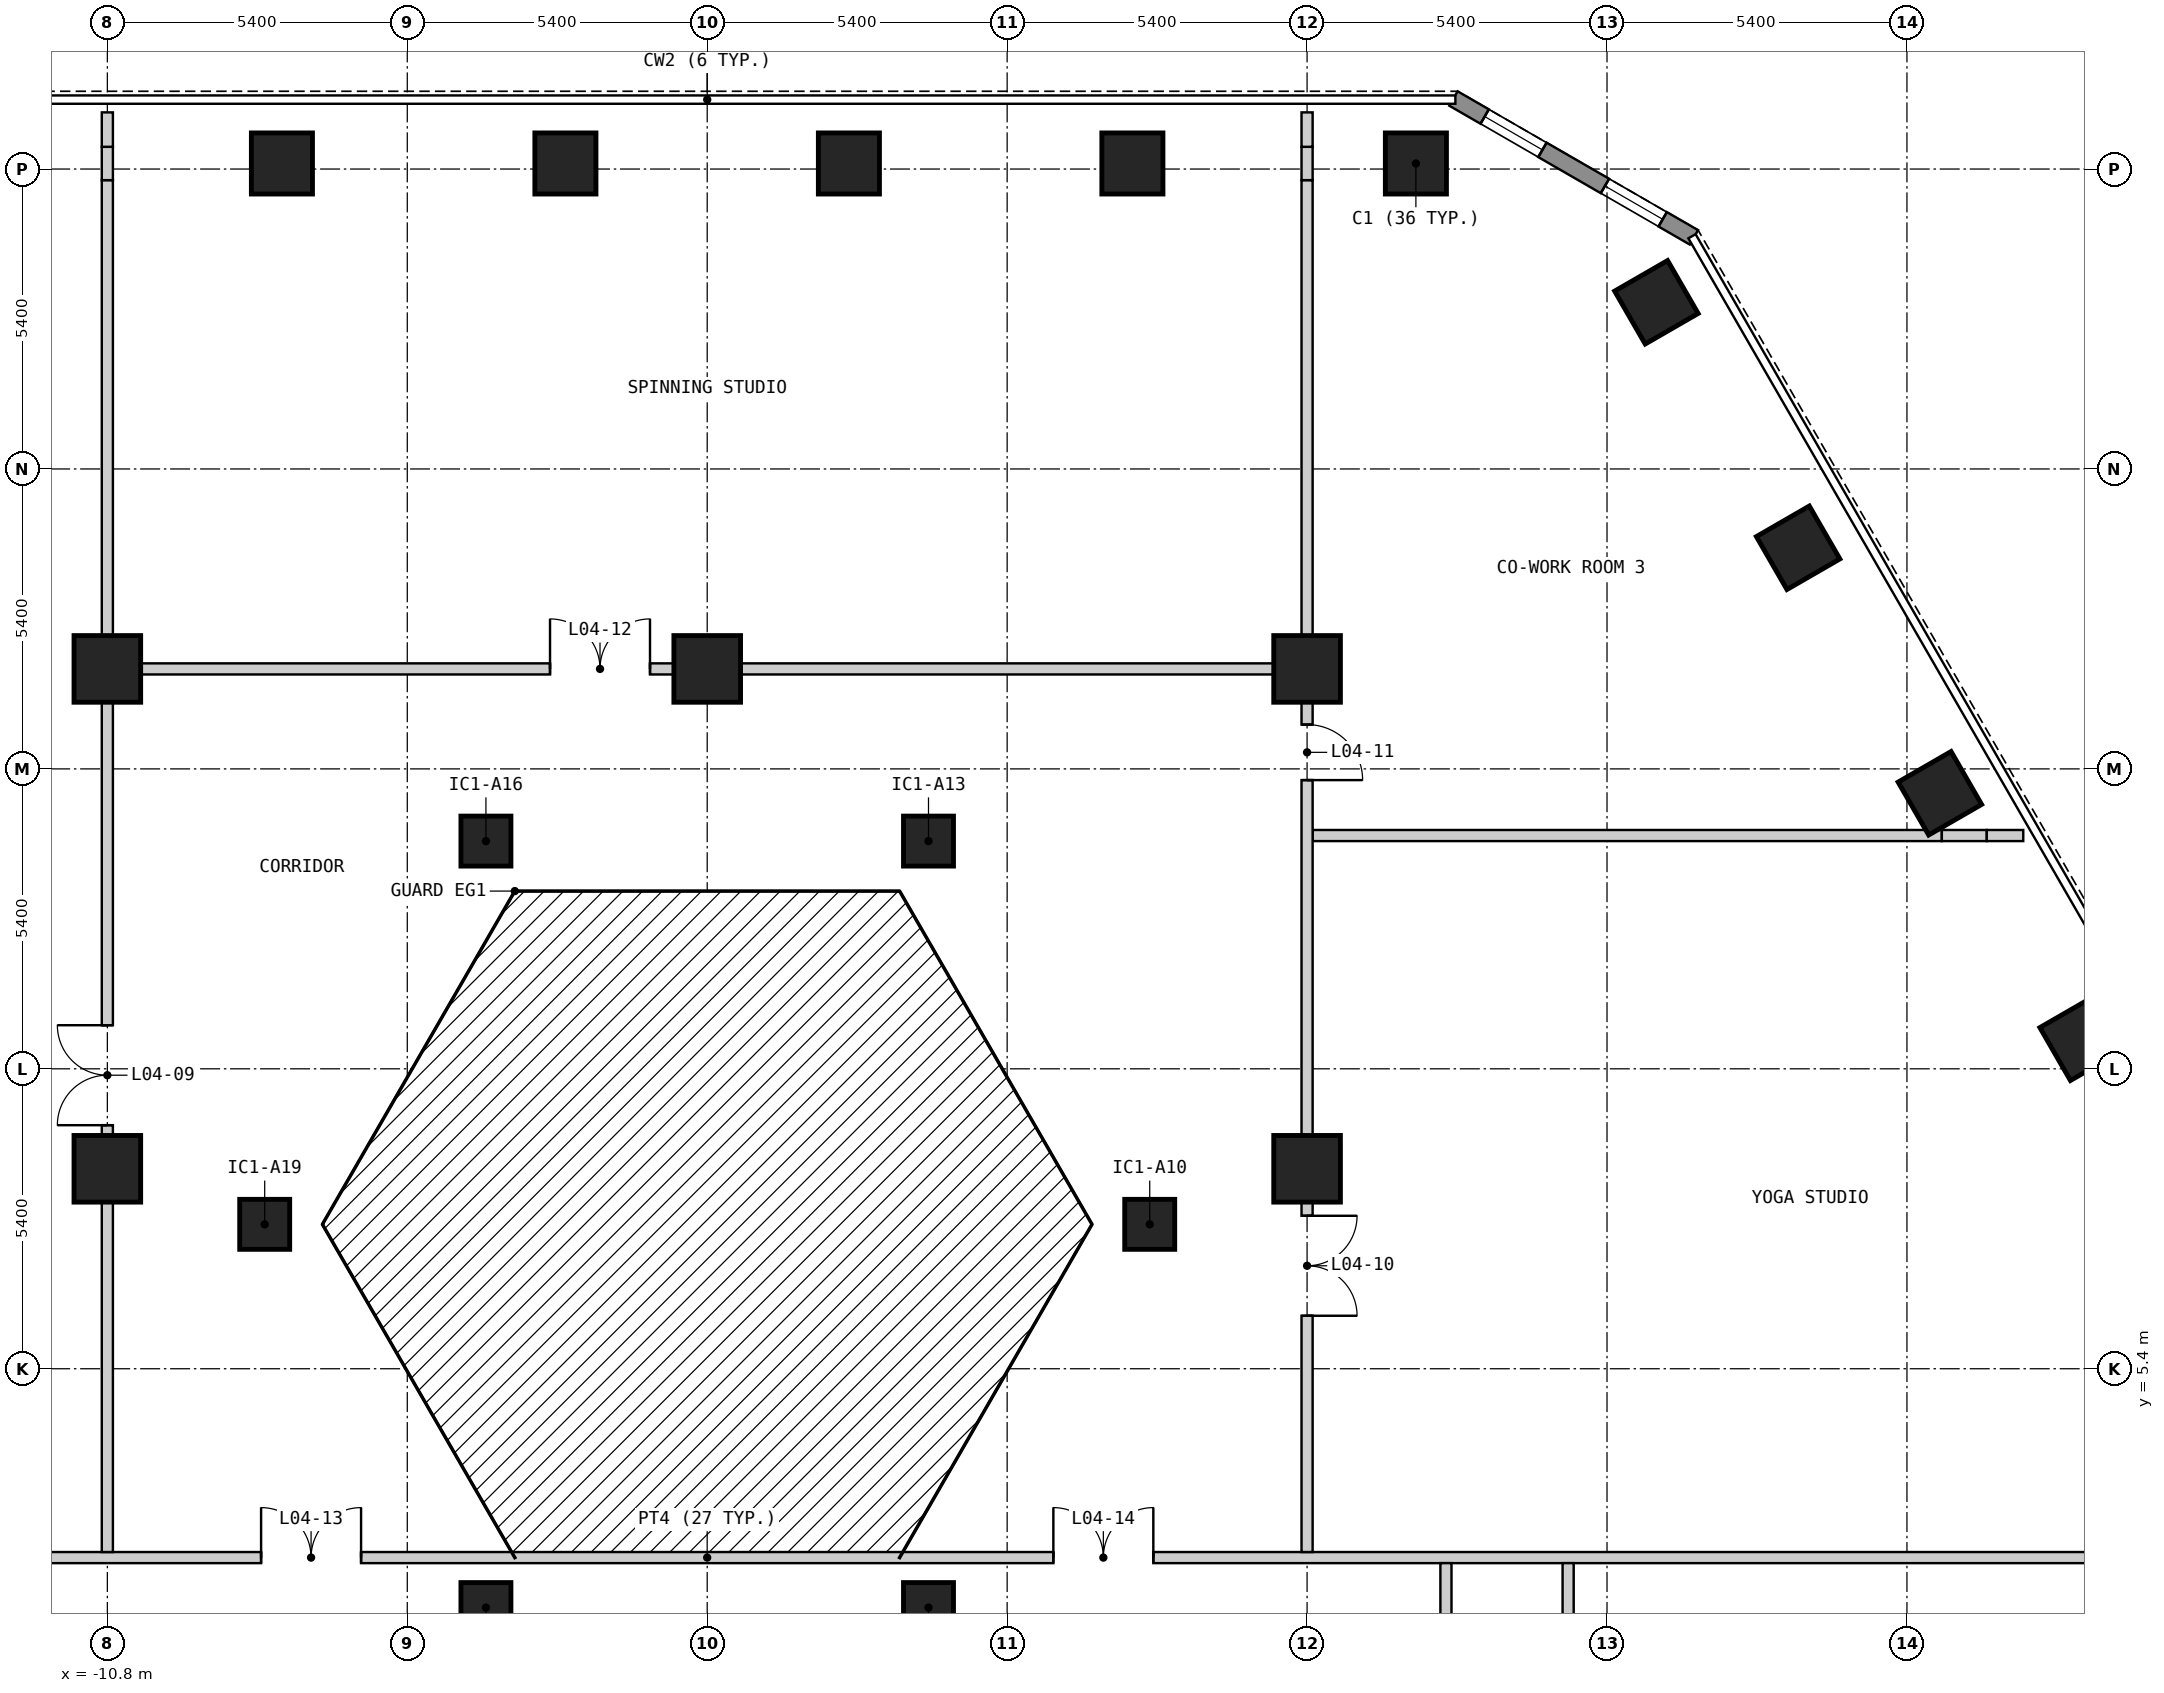
"""IFC4 building model, lengths in metres.
Left out: names, types, materials, properties, quantities, classifications, styles, units other than length and angle.
Written with IfcOpenShell. Run it as: python <this file> out.ifc"""

import sys

from ifc_helpers import new_model, si_unit, direction, frame, frame_2d, origin, origin_2d, place, context, subcontext, project, spatial, polyline, rectangle, outline, extrude, element, fill, save


model = new_model("IFC4")
c1 = context("Model", 3, precision=1e-05, world=origin(), true_north=direction((0.0, 1.0)))
c2 = subcontext(c1, "Body", "Model", "MODEL_VIEW")
j1 = project(units=[si_unit("LENGTHUNIT", "METRE"), si_unit("PLANEANGLEUNIT", "RADIAN")], contexts=[c1])
p1 = place(None, origin())
s1 = spatial("IfcSite", under=j1, at=p1, CompositionType="ELEMENT")
p2 = place(p1, origin())
s2 = spatial("IfcBuilding", under=s1, at=p2, CompositionType="ELEMENT")
p3 = place(p2, frame((0.0, 0.0, 16.2)))
s3 = spatial("IfcBuildingStorey", under=s2, at=p3, CompositionType="ELEMENT", Elevation=16.2)
for number, where, z_axis, x_axis in (
    (1, (12.759, 27.1, 0.0), (0.0, 0.0, 1.0), (-1.0, 0.0, 0.0)),
    (2, (7.655, 27.1, 0.0), (0.0, 0.0, 1.0), (-1.0, 0.0, 0.0)),
    (3, (2.551, 27.1, 0.0), (0.0, 0.0, 1.0), (-1.0, 0.0, 0.0)),
    (4, (-2.553, 27.1, 0.0), (0.0, 0.0, 1.0), (-1.0, 0.0, 0.0)),
    (5, (-7.657, 27.1, 0.0), (0.0, 0.0, 1.0), (-1.0, 0.0, 0.0)),
    (6, (24.745, 11.341, 0.0), (0.0, 0.0, 1.0), (-0.5, 0.866, 0.0)),
    (7, (22.193, 15.761, 0.0), (0.0, 0.0, 1.0), (-0.5, 0.866, 0.0)),
    (8, (19.641, 20.181, 0.0), (0.0, 0.0, 1.0), (-0.5, 0.866, 0.0)),
    (9, (17.089, 24.601, 0.0), (0.0, 0.0, 1.0), (-0.5, 0.866, 0.0)),
):
    element("IfcColumn", number, at=place(p3, frame(where, z_axis=z_axis, x_axis=x_axis)), inside=s3, PredefinedType="COLUMN", context=c2, shape_type="SweptSolid", body=[
        extrude(rectangle(XDim=1.1, YDim=1.1, at=origin_2d()), origin(), (0.0, 0.0, 1.0), 3.6),
    ])
for number, where, z_axis, x_axis in (
    (10, (3.984, 1.1, 0.0), (0.0, 0.0, 1.0), (1.0, 0.0, 0.0)),
    (11, (7.967, 8.0, 0.0), (0.0, 0.0, 1.0), (1.0, 0.0, 0.0)),
    (12, (3.984, 14.9, 0.0), (0.0, 0.0, 1.0), (1.0, 0.0, 0.0)),
    (13, (-3.984, 14.9, 0.0), (0.0, 0.0, 1.0), (1.0, 0.0, 0.0)),
    (14, (-7.967, 8.0, 0.0), (0.0, 0.0, 1.0), (1.0, 0.0, 0.0)),
    (15, (-3.984, 1.1, 0.0), (0.0, 0.0, 1.0), (1.0, 0.0, 0.0)),
):
    element("IfcColumn", number, at=place(p3, frame(where, z_axis=z_axis, x_axis=x_axis)), inside=s3, PredefinedType="COLUMN", context=c2, shape_type="SweptSolid", body=[
        extrude(rectangle(XDim=0.9, YDim=0.9, at=origin_2d()), origin(), (0.0, 0.0, 1.0), 3.6),
    ])
for number, where, z_axis, x_axis in (
    (16, (-10.8, 9.0, 0.0), (0.0, 0.0, 1.0), (1.0, 0.0, 0.0)),
    (17, (-10.8, 18.0, 0.0), (0.0, 0.0, 1.0), (1.0, 0.0, 0.0)),
    (18, (0.0, 18.0, 0.0), (0.0, 0.0, 1.0), (1.0, 0.0, 0.0)),
    (19, (10.8, 9.0, 0.0), (0.0, 0.0, 1.0), (1.0, 0.0, 0.0)),
    (20, (10.8, 18.0, 0.0), (0.0, 0.0, 1.0), (1.0, 0.0, 0.0)),
):
    element("IfcColumn", number, at=place(p3, frame(where, z_axis=z_axis, x_axis=x_axis)), inside=s3, PredefinedType="COLUMN", context=c2, shape_type="SweptSolid", body=[
        extrude(rectangle(XDim=1.2, YDim=1.2, at=origin_2d()), origin(), (0.0, 0.0, 1.0), 3.6),
    ])
p4 = place(p3, frame((17.765, 25.77, 0.0), z_axis=(0.0, 0.0, 1.0), x_axis=(-0.866010750942, 0.50002537861, 0.0)))
e21 = element("IfcWall", 21, at=p4, inside=s3, PredefinedType="SOLIDWALL", context=c2, shape_type="SweptSolid", body=[
    extrude(outline(polyline([(0.0, -0.15), (5.0, -0.15), (4.919, 0.15), (0.08, 0.15), (0.0, -0.15)])), origin(), (0.0, 0.0, 1.0), 3.25),
])
p5 = place(p4, frame((0.65, 0.0, 0.15)))
e22 = element("IfcOpeningElement", 22, at=p5, cuts=e21, PredefinedType="OPENING", context=c2, shape_type="SweptSolid", body=[
    extrude(rectangle(XDim=1.2, YDim=2.1, at=frame_2d((0.6, 1.05))), frame((0.0, 0.16, 0.0), z_axis=(0.0, -1.0, 0.0), x_axis=(1.0, 0.0, 0.0)), (0.0, 0.0, 1.0), 0.32),
])
p6 = place(p4, frame((3.15, 0.0, 0.15)))
e23 = element("IfcOpeningElement", 23, at=p6, cuts=e21, PredefinedType="OPENING", context=c2, shape_type="SweptSolid", body=[
    extrude(rectangle(XDim=1.2, YDim=2.1, at=frame_2d((0.6, 1.05))), frame((0.0, 0.16, 0.0), z_axis=(0.0, -1.0, 0.0), x_axis=(1.0, 0.0, 0.0)), (0.0, 0.0, 1.0), 0.32),
])
p7 = place(p3, frame((-29.549, 2.0, 0.0), z_axis=(0.0, 0.0, 1.0), x_axis=(1.0, 0.0, 0.0)))
e24 = element("IfcWall", 24, at=p7, inside=s3, PredefinedType="PARTITIONING", context=c2, shape_type="SweptSolid", body=[
    extrude(rectangle(XDim=59.097, YDim=0.2, at=frame_2d((29.549, 0.0))), origin(), (0.0, 0.0, 1.0), 3.25),
])
p8 = place(p7, frame((21.517, 0.0, 0.0)))
e25 = element("IfcOpeningElement", 25, at=p8, cuts=e24, PredefinedType="OPENING", context=c2, shape_type="SweptSolid", body=[
    extrude(rectangle(XDim=1.8, YDim=2.1, at=frame_2d((0.9, 1.05))), frame((0.0, 0.11, 0.0), z_axis=(0.0, -1.0, 0.0), x_axis=(1.0, 0.0, 0.0)), (0.0, 0.0, 1.0), 0.22),
])
p9 = place(p7, frame((35.781, 0.0, 0.0)))
e26 = element("IfcOpeningElement", 26, at=p9, cuts=e24, PredefinedType="OPENING", context=c2, shape_type="SweptSolid", body=[
    extrude(rectangle(XDim=1.8, YDim=2.1, at=frame_2d((0.9, 1.05))), frame((0.0, 0.11, 0.0), z_axis=(0.0, -1.0, 0.0), x_axis=(1.0, 0.0, 0.0)), (0.0, 0.0, 1.0), 0.22),
])
p10 = place(p3, frame((10.9, 15.0, 0.0), z_axis=(0.0, 0.0, 1.0), x_axis=(1.0, 0.0, 0.0)))
e27 = element("IfcWall", 27, at=p10, inside=s3, PredefinedType="PARTITIONING", context=c2, shape_type="SweptSolid", body=[
    extrude(rectangle(XDim=11.328, YDim=0.2, at=frame_2d((5.664, 0.0))), origin(), (0.0, 0.0, 1.0), 3.25),
])
p11 = place(p3, frame((22.228, 15.0, 0.0), z_axis=(0.0, 0.0, 1.0), x_axis=(1.0, 0.0, 0.0)))
e28 = element("IfcWall", 28, at=p11, inside=s3, PredefinedType="PARTITIONING", context=c2, shape_type="SweptSolid", body=[
    extrude(rectangle(XDim=0.809, YDim=0.2, at=frame_2d((0.405, 0.0))), origin(), (0.0, 0.0, 1.0), 2.52),
])
p12 = place(p3, frame((23.037, 15.0, 0.0), z_axis=(0.0, 0.0, 1.0), x_axis=(1.0, 0.0, 0.0)))
e29 = element("IfcWall", 29, at=p12, inside=s3, PredefinedType="PARTITIONING", context=c2, shape_type="SweptSolid", body=[
    extrude(rectangle(XDim=0.657, YDim=0.2, at=frame_2d((0.329, 0.0))), origin(), (0.0, 0.0, 1.0), 3.25),
])
p13 = place(p3, frame((-10.7, 18.0, 0.0), z_axis=(0.0, 0.0, 1.0), x_axis=(1.0, 0.0, 0.0)))
e30 = element("IfcWall", 30, at=p13, inside=s3, PredefinedType="PARTITIONING", context=c2, shape_type="SweptSolid", body=[
    extrude(rectangle(XDim=21.4, YDim=0.2, at=frame_2d((10.7, 0.0))), origin(), (0.0, 0.0, 1.0), 3.25),
])
p14 = place(p13, frame((7.87, 0.0, 0.0)))
e31 = element("IfcOpeningElement", 31, at=p14, cuts=e30, PredefinedType="OPENING", context=c2, shape_type="SweptSolid", body=[
    extrude(rectangle(XDim=1.8, YDim=2.1, at=frame_2d((0.9, 1.05))), frame((0.0, 0.11, 0.0), z_axis=(0.0, -1.0, 0.0), x_axis=(1.0, 0.0, 0.0)), (0.0, 0.0, 1.0), 0.22),
])
p15 = place(p3, frame((-10.8, 2.1, 0.0), z_axis=(0.0, 0.0, 1.0), x_axis=(0.0, 1.0, 0.0)))
e32 = element("IfcWall", 32, at=p15, inside=s3, PredefinedType="PARTITIONING", context=c2, shape_type="SweptSolid", body=[
    extrude(rectangle(XDim=24.7, YDim=0.2, at=frame_2d((12.35, 0.0))), origin(), (0.0, 0.0, 1.0), 3.25),
])
p16 = place(p15, frame((7.685, 0.0, 0.0)))
e33 = element("IfcOpeningElement", 33, at=p16, cuts=e32, PredefinedType="OPENING", context=c2, shape_type="SweptSolid", body=[
    extrude(rectangle(XDim=1.8, YDim=2.1, at=frame_2d((0.9, 1.05))), frame((0.0, 0.11, 0.0), z_axis=(0.0, -1.0, 0.0), x_axis=(1.0, 0.0, 0.0)), (0.0, 0.0, 1.0), 0.22),
])
p17 = place(p3, frame((-10.8, 26.8, 0.0), z_axis=(0.0, 0.0, 1.0), x_axis=(0.0, 1.0, 0.0)))
e34 = element("IfcWall", 34, at=p17, inside=s3, PredefinedType="PARTITIONING", context=c2, shape_type="SweptSolid", body=[
    extrude(rectangle(XDim=0.6, YDim=0.2, at=frame_2d((0.3, 0.0))), origin(), (0.0, 0.0, 1.0), 2.52),
])
p18 = place(p3, frame((-10.8, 27.4, 0.0), z_axis=(0.0, 0.0, 1.0), x_axis=(0.0, 1.0, 0.0)))
e35 = element("IfcWall", 35, at=p18, inside=s3, PredefinedType="PARTITIONING", context=c2, shape_type="SweptSolid", body=[
    extrude(rectangle(XDim=0.62, YDim=0.2, at=frame_2d((0.31, 0.0))), origin(), (0.0, 0.0, 1.0), 3.25),
])
p19 = place(p3, frame((10.8, 2.1, 0.0), z_axis=(0.0, 0.0, 1.0), x_axis=(0.0, 1.0, 0.0)))
e36 = element("IfcWall", 36, at=p19, inside=s3, PredefinedType="PARTITIONING", context=c2, shape_type="SweptSolid", body=[
    extrude(rectangle(XDim=24.7, YDim=0.2, at=frame_2d((12.35, 0.0))), origin(), (0.0, 0.0, 1.0), 3.25),
])
p20 = place(p19, frame((6.054, 0.0, 0.0), z_axis=(0.0, 0.0, 1.0), x_axis=(-1.0, 0.0, 0.0)))
e37 = element("IfcOpeningElement", 37, at=p20, cuts=e36, PredefinedType="OPENING", context=c2, shape_type="SweptSolid", body=[
    extrude(rectangle(XDim=1.8, YDim=2.1, at=frame_2d((0.9, 1.05))), frame((0.0, 0.11, 0.0), z_axis=(0.0, -1.0, 0.0), x_axis=(1.0, 0.0, 0.0)), (0.0, 0.0, 1.0), 0.22),
])
p21 = place(p19, frame((14.898, 0.0, 0.0), z_axis=(0.0, 0.0, 1.0), x_axis=(-1.0, 0.0, 0.0)))
e38 = element("IfcOpeningElement", 38, at=p21, cuts=e36, PredefinedType="OPENING", context=c2, shape_type="SweptSolid", body=[
    extrude(rectangle(XDim=1.0, YDim=2.1, at=frame_2d((0.5, 1.05))), frame((0.0, 0.11, 0.0), z_axis=(0.0, -1.0, 0.0), x_axis=(1.0, 0.0, 0.0)), (0.0, 0.0, 1.0), 0.22),
])
p22 = place(p3, frame((10.8, 26.8, 0.0), z_axis=(0.0, 0.0, 1.0), x_axis=(0.0, 1.0, 0.0)))
e39 = element("IfcWall", 39, at=p22, inside=s3, PredefinedType="PARTITIONING", context=c2, shape_type="SweptSolid", body=[
    extrude(rectangle(XDim=0.6, YDim=0.2, at=frame_2d((0.3, 0.0))), origin(), (0.0, 0.0, 1.0), 2.52),
])
p23 = place(p3, frame((10.8, 27.4, 0.0), z_axis=(0.0, 0.0, 1.0), x_axis=(0.0, 1.0, 0.0)))
e40 = element("IfcWall", 40, at=p23, inside=s3, PredefinedType="PARTITIONING", context=c2, shape_type="SweptSolid", body=[
    extrude(rectangle(XDim=0.62, YDim=0.2, at=frame_2d((0.31, 0.0))), origin(), (0.0, 0.0, 1.0), 3.25),
])
p24 = place(p3, frame((13.3, -4.88, 0.0), z_axis=(0.0, 0.0, 1.0), x_axis=(0.0, 1.0, 0.0)))
e41 = element("IfcWall", 41, at=p24, inside=s3, PredefinedType="PARTITIONING", context=c2, shape_type="SweptSolid", body=[
    extrude(rectangle(XDim=6.78, YDim=0.2, at=frame_2d((3.39, 0.0))), origin(), (0.0, 0.0, 1.0), 3.25),
])
p25 = place(p3, frame((15.5, -25.114, 0.0), z_axis=(0.0, 0.0, 1.0), x_axis=(0.0, 1.0, 0.0)))
e42 = element("IfcWall", 42, at=p25, inside=s3, PredefinedType="PARTITIONING", context=c2, shape_type="SweptSolid", body=[
    extrude(rectangle(XDim=27.014, YDim=0.2, at=frame_2d((13.507, 0.0))), origin(), (0.0, 0.0, 1.0), 3.25),
])
p26 = place(p25, frame((9.016, 0.0, 0.0), z_axis=(0.0, 0.0, 1.0), x_axis=(-1.0, 0.0, 0.0)))
e43 = element("IfcOpeningElement", 43, at=p26, cuts=e42, PredefinedType="OPENING", context=c2, shape_type="SweptSolid", body=[
    extrude(rectangle(XDim=1.0, YDim=2.1, at=frame_2d((0.5, 1.05))), frame((0.0, 0.11, 0.0), z_axis=(0.0, -1.0, 0.0), x_axis=(1.0, 0.0, 0.0)), (0.0, 0.0, 1.0), 0.22),
])
p27 = place(p25, frame((21.012, 0.0, 0.0), z_axis=(0.0, 0.0, 1.0), x_axis=(-1.0, 0.0, 0.0)))
e44 = element("IfcOpeningElement", 44, at=p27, cuts=e42, PredefinedType="OPENING", context=c2, shape_type="SweptSolid", body=[
    extrude(rectangle(XDim=1.8, YDim=2.1, at=frame_2d((0.9, 1.05))), frame((0.0, 0.11, 0.0), z_axis=(0.0, -1.0, 0.0), x_axis=(1.0, 0.0, 0.0)), (0.0, 0.0, 1.0), 0.22),
])
p28 = place(p5, origin())
e45 = element("IfcWindow", 45, at=p28, inside=s3, PartitioningType="SINGLE_PANEL", PredefinedType="WINDOW", context=c2, shape_type="SweptSolid", body=[
    extrude(rectangle(XDim=1.2, YDim=2.1, at=frame_2d((0.6, 1.05))), frame((0.0, 0.03, 0.0), z_axis=(0.0, -1.0, 0.0), x_axis=(1.0, 0.0, 0.0)), (0.0, 0.0, 1.0), 0.06),
])
fill(e22, e45)
p29 = place(p6, origin())
e46 = element("IfcWindow", 46, at=p29, inside=s3, PartitioningType="SINGLE_PANEL", PredefinedType="WINDOW", context=c2, shape_type="SweptSolid", body=[
    extrude(rectangle(XDim=1.2, YDim=2.1, at=frame_2d((0.6, 1.05))), frame((0.0, 0.03, 0.0), z_axis=(0.0, -1.0, 0.0), x_axis=(1.0, 0.0, 0.0)), (0.0, 0.0, 1.0), 0.06),
])
fill(e23, e46)
p30 = place(p16, origin())
e47 = element("IfcDoor", 47, at=p30, inside=s3, OperationType="DOUBLE_DOOR_SINGLE_SWING", PredefinedType="DOOR", context=c2, shape_type="SweptSolid", body=[
    extrude(rectangle(XDim=1.8, YDim=2.1, at=frame_2d((0.9, 1.05))), frame((0.0, 0.025, 0.0), z_axis=(0.0, -1.0, 0.0), x_axis=(1.0, 0.0, 0.0)), (0.0, 0.0, 1.0), 0.05),
])
fill(e33, e47)
p31 = place(p20, origin())
e48 = element("IfcDoor", 48, at=p31, inside=s3, OperationType="DOUBLE_DOOR_SINGLE_SWING", PredefinedType="DOOR", context=c2, shape_type="SweptSolid", body=[
    extrude(rectangle(XDim=1.8, YDim=2.1, at=frame_2d((0.9, 1.05))), frame((0.0, 0.025, 0.0), z_axis=(0.0, -1.0, 0.0), x_axis=(1.0, 0.0, 0.0)), (0.0, 0.0, 1.0), 0.05),
])
fill(e37, e48)
p32 = place(p21, origin())
e49 = element("IfcDoor", 49, at=p32, inside=s3, OperationType="SINGLE_SWING_RIGHT", PredefinedType="DOOR", context=c2, shape_type="SweptSolid", body=[
    extrude(rectangle(XDim=1.0, YDim=2.1, at=frame_2d((0.5, 1.05))), frame((0.0, 0.025, 0.0), z_axis=(0.0, -1.0, 0.0), x_axis=(1.0, 0.0, 0.0)), (0.0, 0.0, 1.0), 0.05),
])
fill(e38, e49)
p33 = place(p14, origin())
e50 = element("IfcDoor", 50, at=p33, inside=s3, OperationType="DOUBLE_DOOR_SINGLE_SWING", PredefinedType="DOOR", context=c2, shape_type="SweptSolid", body=[
    extrude(rectangle(XDim=1.8, YDim=2.1, at=frame_2d((0.9, 1.05))), frame((0.0, 0.025, 0.0), z_axis=(0.0, -1.0, 0.0), x_axis=(1.0, 0.0, 0.0)), (0.0, 0.0, 1.0), 0.05),
])
fill(e31, e50)
p34 = place(p8, origin())
e51 = element("IfcDoor", 51, at=p34, inside=s3, OperationType="DOUBLE_DOOR_SINGLE_SWING", PredefinedType="DOOR", context=c2, shape_type="SweptSolid", body=[
    extrude(rectangle(XDim=1.8, YDim=2.1, at=frame_2d((0.9, 1.05))), frame((0.0, 0.025, 0.0), z_axis=(0.0, -1.0, 0.0), x_axis=(1.0, 0.0, 0.0)), (0.0, 0.0, 1.0), 0.05),
])
fill(e25, e51)
p35 = place(p9, origin())
e52 = element("IfcDoor", 52, at=p35, inside=s3, OperationType="DOUBLE_DOOR_SINGLE_SWING", PredefinedType="DOOR", context=c2, shape_type="SweptSolid", body=[
    extrude(rectangle(XDim=1.8, YDim=2.1, at=frame_2d((0.9, 1.05))), frame((0.0, 0.025, 0.0), z_axis=(0.0, -1.0, 0.0), x_axis=(1.0, 0.0, 0.0)), (0.0, 0.0, 1.0), 0.05),
])
fill(e26, e52)
save(model, sys.argv[1])
